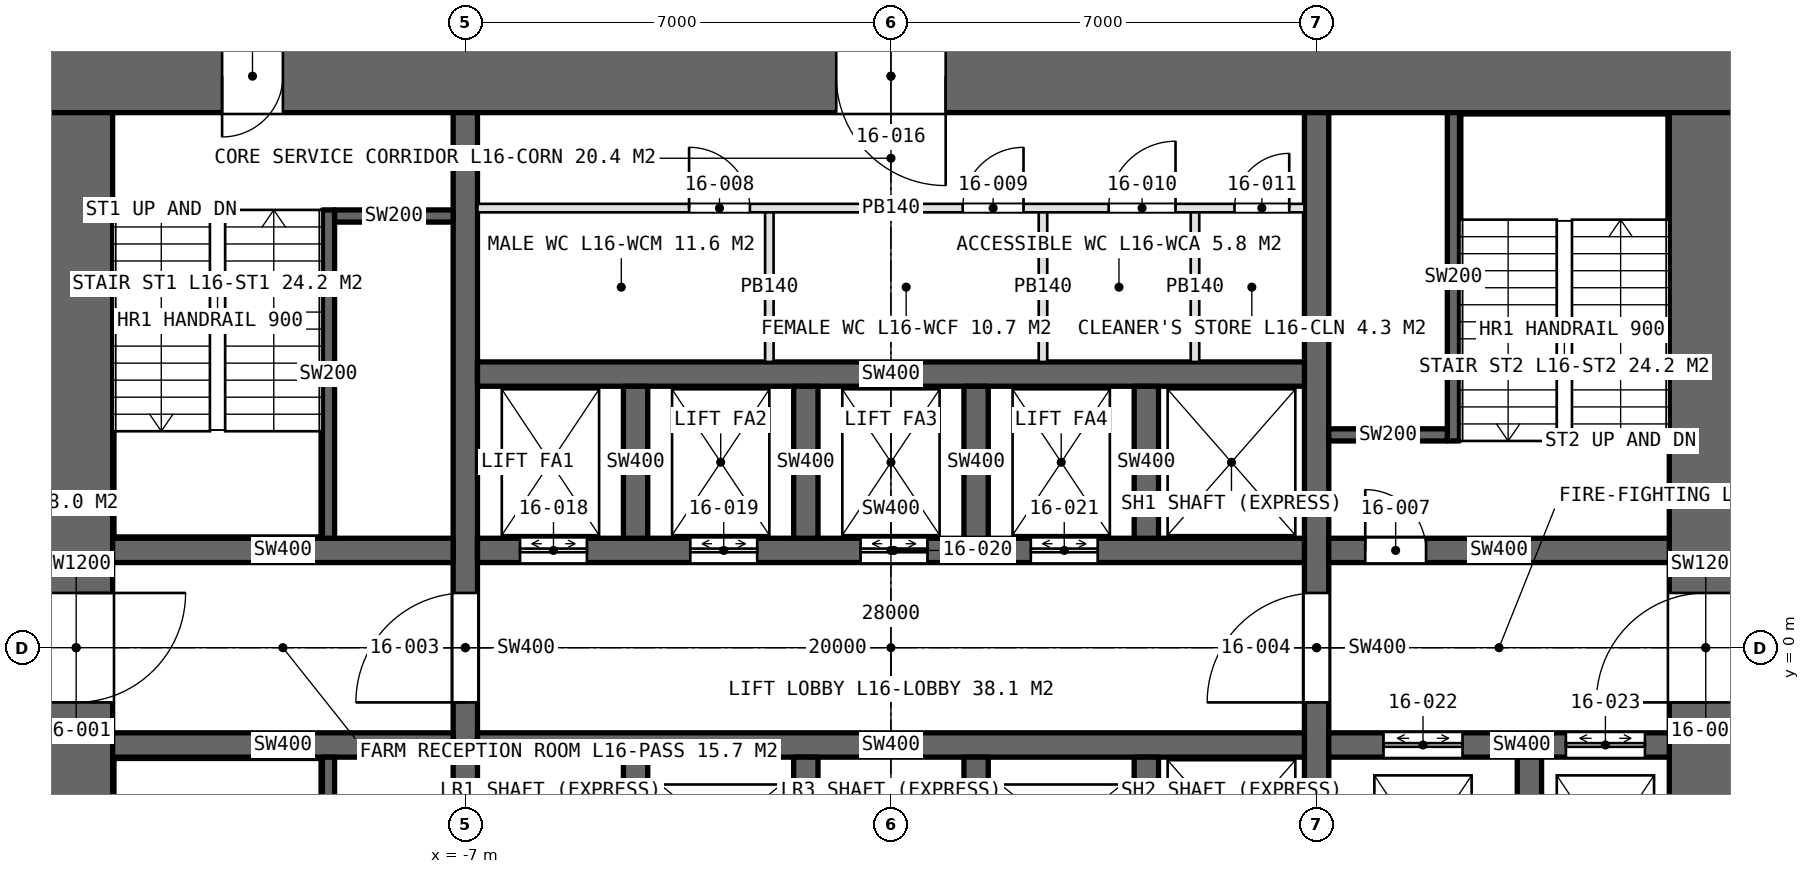
"""IFC4 building model, lengths in metres.
Left out: names, types, materials, properties, quantities, classifications, styles, units other than length and angle.
Written with IfcOpenShell. Run it as: python <this file> out.ifc"""

import sys

from ifc_helpers import new_model, si_unit, direction, frame, frame_2d, origin, place, context, subcontext, project, spatial, rectangle, extrude, element, fill, save


model = new_model("IFC4")
c1 = context("Model", 3, precision=1e-05, world=origin(), true_north=direction((0.0, 1.0)))
c2 = subcontext(c1, "Body", "Model", "MODEL_VIEW")
j1 = project(units=[si_unit("LENGTHUNIT", "METRE"), si_unit("PLANEANGLEUNIT", "RADIAN")], contexts=[c1])
p1 = place(None, origin())
s1 = spatial("IfcSite", under=j1, at=p1, CompositionType="ELEMENT")
p2 = place(p1, origin())
s2 = spatial("IfcBuilding", under=s1, at=p2, CompositionType="ELEMENT")
p3 = place(p2, frame((0.0, 0.0, 80.0)))
s3 = spatial("IfcBuildingStorey", under=s2, at=p3, CompositionType="ELEMENT", Elevation=80.0)
p4 = place(p3, frame((14.0, 9.4, 0.0), z_axis=(0.0, 0.0, 1.0), x_axis=(-1.0, 0.0, 0.0)))
e1 = element("IfcWall", 1, at=p4, inside=s3, PredefinedType="SHEAR", context=c2, shape_type="SweptSolid", body=[
    extrude(rectangle(XDim=28.0, YDim=1.2, at=frame_2d((14.0, 0.0))), origin(), (0.0, 0.0, 1.0), 5.0),
])
p5 = place(p4, frame((24.0, 0.0, 0.0)))
e2 = element("IfcOpeningElement", 2, at=p5, cuts=e1, PredefinedType="OPENING", context=c2, shape_type="SweptSolid", body=[
    extrude(rectangle(XDim=1.0, YDim=2.4, at=frame_2d((0.5, 1.2))), frame((0.0, 0.61, 0.0), z_axis=(0.0, -1.0, 0.0), x_axis=(1.0, 0.0, 0.0)), (0.0, 0.0, 1.0), 1.22),
])
p6 = place(p4, frame((13.1, 0.0, 0.0)))
e3 = element("IfcOpeningElement", 3, at=p6, cuts=e1, PredefinedType="OPENING", context=c2, shape_type="SweptSolid", body=[
    extrude(rectangle(XDim=1.8, YDim=2.4, at=frame_2d((0.9, 1.2))), frame((0.0, 0.61, 0.0), z_axis=(0.0, -1.0, 0.0), x_axis=(1.0, 0.0, 0.0)), (0.0, 0.0, 1.0), 1.22),
])
p7 = place(p3, frame((-13.4, 8.8, 0.0), z_axis=(0.0, 0.0, 1.0), x_axis=(0.0, -1.0, 0.0)))
e4 = element("IfcWall", 4, at=p7, inside=s3, PredefinedType="SHEAR", context=c2, shape_type="SweptSolid", body=[
    extrude(rectangle(XDim=17.6, YDim=1.2, at=frame_2d((8.8, 0.0))), origin(), (0.0, 0.0, 1.0), 5.0),
])
p8 = place(p7, frame((7.9, 0.0, 0.0)))
e5 = element("IfcOpeningElement", 5, at=p8, cuts=e4, PredefinedType="OPENING", context=c2, shape_type="SweptSolid", body=[
    extrude(rectangle(XDim=1.8, YDim=2.4, at=frame_2d((0.9, 1.2))), frame((0.0, 0.61, 0.0), z_axis=(0.0, -1.0, 0.0), x_axis=(1.0, 0.0, 0.0)), (0.0, 0.0, 1.0), 1.22),
])
p9 = place(p7, frame((16.5, 0.0, 0.0)))
e6 = element("IfcOpeningElement", 6, at=p9, cuts=e4, PredefinedType="OPENING", context=c2, shape_type="SweptSolid", body=[
    extrude(rectangle(XDim=1.0, YDim=2.4, at=frame_2d((0.5, 1.2))), frame((0.0, 0.61, 0.0), z_axis=(0.0, -1.0, 0.0), x_axis=(1.0, 0.0, 0.0)), (0.0, 0.0, 1.0), 1.22),
])
p10 = place(p3, frame((13.4, -8.8, 0.0), z_axis=(0.0, 0.0, 1.0), x_axis=(0.0, 1.0, 0.0)))
e7 = element("IfcWall", 7, at=p10, inside=s3, PredefinedType="SHEAR", context=c2, shape_type="SweptSolid", body=[
    extrude(rectangle(XDim=17.6, YDim=1.2, at=frame_2d((8.8, 0.0))), origin(), (0.0, 0.0, 1.0), 5.0),
])
p11 = place(p10, frame((7.9, 0.0, 0.0)))
e8 = element("IfcOpeningElement", 8, at=p11, cuts=e7, PredefinedType="OPENING", context=c2, shape_type="SweptSolid", body=[
    extrude(rectangle(XDim=1.8, YDim=2.4, at=frame_2d((0.9, 1.2))), frame((0.0, 0.61, 0.0), z_axis=(0.0, -1.0, 0.0), x_axis=(1.0, 0.0, 0.0)), (0.0, 0.0, 1.0), 1.22),
])
p12 = place(p3, frame((-7.0, -8.8, 0.0), z_axis=(0.0, 0.0, 1.0), x_axis=(0.0, 1.0, 0.0)))
e9 = element("IfcWall", 9, at=p12, inside=s3, PredefinedType="SHEAR", context=c2, shape_type="SweptSolid", body=[
    extrude(rectangle(XDim=17.6, YDim=0.4, at=frame_2d((8.8, 0.0))), origin(), (0.0, 0.0, 1.0), 5.0),
])
p13 = place(p12, frame((7.9, 0.0, 0.0)))
e10 = element("IfcOpeningElement", 10, at=p13, cuts=e9, PredefinedType="OPENING", context=c2, shape_type="SweptSolid", body=[
    extrude(rectangle(XDim=1.8, YDim=2.4, at=frame_2d((0.9, 1.2))), frame((0.0, 0.21, 0.0), z_axis=(0.0, -1.0, 0.0), x_axis=(1.0, 0.0, 0.0)), (0.0, 0.0, 1.0), 0.42),
])
p14 = place(p3, frame((7.0, -8.8, 0.0), z_axis=(0.0, 0.0, 1.0), x_axis=(0.0, 1.0, 0.0)))
e11 = element("IfcWall", 11, at=p14, inside=s3, PredefinedType="SHEAR", context=c2, shape_type="SweptSolid", body=[
    extrude(rectangle(XDim=17.6, YDim=0.4, at=frame_2d((8.8, 0.0))), origin(), (0.0, 0.0, 1.0), 5.0),
])
p15 = place(p14, frame((7.9, 0.0, 0.0)))
e12 = element("IfcOpeningElement", 12, at=p15, cuts=e11, PredefinedType="OPENING", context=c2, shape_type="SweptSolid", body=[
    extrude(rectangle(XDim=1.8, YDim=2.4, at=frame_2d((0.9, 1.2))), frame((0.0, 0.21, 0.0), z_axis=(0.0, -1.0, 0.0), x_axis=(1.0, 0.0, 0.0)), (0.0, 0.0, 1.0), 0.42),
])
p16 = place(p3, frame((-6.8, 1.6, 0.0), z_axis=(0.0, 0.0, 1.0), x_axis=(1.0, 0.0, 0.0)))
e13 = element("IfcWall", 13, at=p16, inside=s3, PredefinedType="SHEAR", context=c2, shape_type="SweptSolid", body=[
    extrude(rectangle(XDim=13.6, YDim=0.4, at=frame_2d((6.8, 0.0))), origin(), (0.0, 0.0, 1.0), 5.0),
])
p17 = place(p16, frame((0.7, 0.0, 0.0)))
e14 = element("IfcOpeningElement", 14, at=p17, cuts=e13, PredefinedType="OPENING", context=c2, shape_type="SweptSolid", body=[
    extrude(rectangle(XDim=1.1, YDim=2.4, at=frame_2d((0.55, 1.2))), frame((0.0, 0.21, 0.0), z_axis=(0.0, -1.0, 0.0), x_axis=(1.0, 0.0, 0.0)), (0.0, 0.0, 1.0), 0.42),
])
p18 = place(p16, frame((3.5, 0.0, 0.0)))
e15 = element("IfcOpeningElement", 15, at=p18, cuts=e13, PredefinedType="OPENING", context=c2, shape_type="SweptSolid", body=[
    extrude(rectangle(XDim=1.1, YDim=2.4, at=frame_2d((0.55, 1.2))), frame((0.0, 0.21, 0.0), z_axis=(0.0, -1.0, 0.0), x_axis=(1.0, 0.0, 0.0)), (0.0, 0.0, 1.0), 0.42),
])
p19 = place(p16, frame((6.3, 0.0, 0.0)))
e16 = element("IfcOpeningElement", 16, at=p19, cuts=e13, PredefinedType="OPENING", context=c2, shape_type="SweptSolid", body=[
    extrude(rectangle(XDim=1.1, YDim=2.4, at=frame_2d((0.55, 1.2))), frame((0.0, 0.21, 0.0), z_axis=(0.0, -1.0, 0.0), x_axis=(1.0, 0.0, 0.0)), (0.0, 0.0, 1.0), 0.42),
])
p20 = place(p16, frame((9.1, 0.0, 0.0)))
e17 = element("IfcOpeningElement", 17, at=p20, cuts=e13, PredefinedType="OPENING", context=c2, shape_type="SweptSolid", body=[
    extrude(rectangle(XDim=1.1, YDim=2.4, at=frame_2d((0.55, 1.2))), frame((0.0, 0.21, 0.0), z_axis=(0.0, -1.0, 0.0), x_axis=(1.0, 0.0, 0.0)), (0.0, 0.0, 1.0), 0.42),
])
for number, where, z_axis, x_axis in (
    (18, (-6.8, -1.6, 0.0), (0.0, 0.0, 1.0), (1.0, 0.0, 0.0)),
    (19, (-6.8, 4.5, 0.0), (0.0, 0.0, 1.0), (1.0, 0.0, 0.0)),
):
    element("IfcWall", number, at=place(p3, frame(where, z_axis=z_axis, x_axis=x_axis)), inside=s3, PredefinedType="SHEAR", context=c2, shape_type="SweptSolid", body=[
        extrude(rectangle(XDim=13.6, YDim=0.4, at=frame_2d((6.8, 0.0))), origin(), (0.0, 0.0, 1.0), 5.0),
    ])
for number, where, z_axis, x_axis in (
    (20, (-12.8, 1.6, 0.0), (0.0, 0.0, 1.0), (1.0, 0.0, 0.0)),
    (21, (-12.8, -1.6, 0.0), (0.0, 0.0, 1.0), (1.0, 0.0, 0.0)),
):
    element("IfcWall", number, at=place(p3, frame(where, z_axis=z_axis, x_axis=x_axis)), inside=s3, PredefinedType="SHEAR", context=c2, shape_type="SweptSolid", body=[
        extrude(rectangle(XDim=5.6, YDim=0.4, at=frame_2d((2.8, 0.0))), origin(), (0.0, 0.0, 1.0), 5.0),
    ])
p21 = place(p3, frame((7.2, 1.6, 0.0), z_axis=(0.0, 0.0, 1.0), x_axis=(1.0, 0.0, 0.0)))
e22 = element("IfcWall", 22, at=p21, inside=s3, PredefinedType="SHEAR", context=c2, shape_type="SweptSolid", body=[
    extrude(rectangle(XDim=5.6, YDim=0.4, at=frame_2d((2.8, 0.0))), origin(), (0.0, 0.0, 1.0), 5.0),
])
p22 = place(p21, frame((0.6, 0.0, 0.0)))
e23 = element("IfcOpeningElement", 23, at=p22, cuts=e22, PredefinedType="OPENING", context=c2, shape_type="SweptSolid", body=[
    extrude(rectangle(XDim=1.0, YDim=2.4, at=frame_2d((0.5, 1.2))), frame((0.0, 0.21, 0.0), z_axis=(0.0, -1.0, 0.0), x_axis=(1.0, 0.0, 0.0)), (0.0, 0.0, 1.0), 0.42),
])
p23 = place(p3, frame((7.2, -1.6, 0.0), z_axis=(0.0, 0.0, 1.0), x_axis=(1.0, 0.0, 0.0)))
e24 = element("IfcWall", 24, at=p23, inside=s3, PredefinedType="SHEAR", context=c2, shape_type="SweptSolid", body=[
    extrude(rectangle(XDim=5.6, YDim=0.4, at=frame_2d((2.8, 0.0))), origin(), (0.0, 0.0, 1.0), 5.0),
])
p24 = place(p23, frame((0.9, 0.0, 0.0)))
e25 = element("IfcOpeningElement", 25, at=p24, cuts=e24, PredefinedType="OPENING", context=c2, shape_type="SweptSolid", body=[
    extrude(rectangle(XDim=1.3, YDim=2.4, at=frame_2d((0.65, 1.2))), frame((0.0, 0.21, 0.0), z_axis=(0.0, -1.0, 0.0), x_axis=(1.0, 0.0, 0.0)), (0.0, 0.0, 1.0), 0.42),
])
p25 = place(p23, frame((3.9, 0.0, 0.0)))
e26 = element("IfcOpeningElement", 26, at=p25, cuts=e24, PredefinedType="OPENING", context=c2, shape_type="SweptSolid", body=[
    extrude(rectangle(XDim=1.3, YDim=2.4, at=frame_2d((0.65, 1.2))), frame((0.0, 0.21, 0.0), z_axis=(0.0, -1.0, 0.0), x_axis=(1.0, 0.0, 0.0)), (0.0, 0.0, 1.0), 0.42),
])
p26 = place(p3, frame((10.5, -4.8, 0.0), z_axis=(0.0, 0.0, 1.0), x_axis=(0.0, 1.0, 0.0)))
e27 = element("IfcWall", 27, at=p26, inside=s3, PredefinedType="SHEAR", context=c2, shape_type="SweptSolid", body=[
    extrude(rectangle(XDim=3.0, YDim=0.4, at=frame_2d((1.5, 0.0))), origin(), (0.0, 0.0, 1.0), 5.0),
])
for number, where, z_axis, x_axis in (
    (28, (-4.2, 1.8, 0.0), (0.0, 0.0, 1.0), (0.0, 1.0, 0.0)),
    (29, (-4.2, -4.3, 0.0), (0.0, 0.0, 1.0), (0.0, 1.0, 0.0)),
    (30, (-1.4, 1.8, 0.0), (0.0, 0.0, 1.0), (0.0, 1.0, 0.0)),
    (31, (-1.4, -4.3, 0.0), (0.0, 0.0, 1.0), (0.0, 1.0, 0.0)),
    (32, (1.4, 1.8, 0.0), (0.0, 0.0, 1.0), (0.0, 1.0, 0.0)),
    (33, (1.4, -4.3, 0.0), (0.0, 0.0, 1.0), (0.0, 1.0, 0.0)),
    (34, (4.2, 1.8, 0.0), (0.0, 0.0, 1.0), (0.0, 1.0, 0.0)),
    (35, (4.2, -4.3, 0.0), (0.0, 0.0, 1.0), (0.0, 1.0, 0.0)),
):
    element("IfcWall", number, at=place(p3, frame(where, z_axis=z_axis, x_axis=x_axis)), inside=s3, PredefinedType="SHEAR", context=c2, shape_type="SweptSolid", body=[
        extrude(rectangle(XDim=2.5, YDim=0.4, at=frame_2d((1.25, 0.0))), origin(), (0.0, 0.0, 1.0), 5.0),
    ])
p27 = place(p3, frame((-6.8, 7.23, 0.0), z_axis=(0.0, 0.0, 1.0), x_axis=(1.0, 0.0, 0.0)))
e36 = element("IfcWall", 36, at=p27, inside=s3, PredefinedType="PARTITIONING", context=c2, shape_type="SweptSolid", body=[
    extrude(rectangle(XDim=13.6, YDim=0.14, at=frame_2d((6.8, 0.0))), origin(), (0.0, 0.0, 1.0), 4.75),
])
p28 = place(p27, frame((3.48, 0.0, 0.0)))
e37 = element("IfcOpeningElement", 37, at=p28, cuts=e36, PredefinedType="OPENING", context=c2, shape_type="SweptSolid", body=[
    extrude(rectangle(XDim=1.0, YDim=2.4, at=frame_2d((0.5, 1.2))), frame((0.0, 0.08, 0.0), z_axis=(0.0, -1.0, 0.0), x_axis=(1.0, 0.0, 0.0)), (0.0, 0.0, 1.0), 0.16),
])
p29 = place(p27, frame((7.98, 0.0, 0.0)))
e38 = element("IfcOpeningElement", 38, at=p29, cuts=e36, PredefinedType="OPENING", context=c2, shape_type="SweptSolid", body=[
    extrude(rectangle(XDim=1.0, YDim=2.4, at=frame_2d((0.5, 1.2))), frame((0.0, 0.08, 0.0), z_axis=(0.0, -1.0, 0.0), x_axis=(1.0, 0.0, 0.0)), (0.0, 0.0, 1.0), 0.16),
])
p30 = place(p27, frame((10.38, 0.0, 0.0)))
e39 = element("IfcOpeningElement", 39, at=p30, cuts=e36, PredefinedType="OPENING", context=c2, shape_type="SweptSolid", body=[
    extrude(rectangle(XDim=1.1, YDim=2.4, at=frame_2d((0.55, 1.2))), frame((0.0, 0.08, 0.0), z_axis=(0.0, -1.0, 0.0), x_axis=(1.0, 0.0, 0.0)), (0.0, 0.0, 1.0), 0.16),
])
p31 = place(p27, frame((12.45, 0.0, 0.0)))
e40 = element("IfcOpeningElement", 40, at=p31, cuts=e36, PredefinedType="OPENING", context=c2, shape_type="SweptSolid", body=[
    extrude(rectangle(XDim=0.9, YDim=2.4, at=frame_2d((0.45, 1.2))), frame((0.0, 0.08, 0.0), z_axis=(0.0, -1.0, 0.0), x_axis=(1.0, 0.0, 0.0)), (0.0, 0.0, 1.0), 0.16),
])
for number, where, z_axis, x_axis in (
    (41, (-2.0, 4.7, 0.0), (0.0, 0.0, 1.0), (0.0, 1.0, 0.0)),
    (42, (2.5, 4.7, 0.0), (0.0, 0.0, 1.0), (0.0, 1.0, 0.0)),
    (43, (5.0, 4.7, 0.0), (0.0, 0.0, 1.0), (0.0, 1.0, 0.0)),
):
    element("IfcWall", number, at=place(p3, frame(where, z_axis=z_axis, x_axis=x_axis)), inside=s3, PredefinedType="PARTITIONING", context=c2, shape_type="SweptSolid", body=[
        extrude(rectangle(XDim=2.46, YDim=0.14, at=frame_2d((1.23, 0.0))), origin(), (0.0, 0.0, 1.0), 4.75),
    ])
p32 = place(p3, frame((-9.25, 7.2, 0.0), z_axis=(0.0, 0.0, 1.0), x_axis=(0.0, -1.0, 0.0)))
e44 = element("IfcWall", 44, at=p32, inside=s3, PredefinedType="SOLIDWALL", context=c2, shape_type="SweptSolid", body=[
    extrude(rectangle(XDim=5.4, YDim=0.2, at=frame_2d((2.7, 0.0))), origin(), (0.0, 0.0, 1.0), 5.0),
])
p33 = place(p3, frame((-9.15, 7.1, 0.0), z_axis=(0.0, 0.0, 1.0), x_axis=(1.0, 0.0, 0.0)))
e45 = element("IfcWall", 45, at=p33, inside=s3, PredefinedType="SOLIDWALL", context=c2, shape_type="SweptSolid", body=[
    extrude(rectangle(XDim=1.95, YDim=0.2, at=frame_2d((0.975, 0.0))), origin(), (0.0, 0.0, 1.0), 5.0),
])
p34 = place(p3, frame((-9.25, -7.2, 0.0), z_axis=(0.0, 0.0, 1.0), x_axis=(0.0, 1.0, 0.0)))
e46 = element("IfcWall", 46, at=p34, inside=s3, PredefinedType="SOLIDWALL", context=c2, shape_type="SweptSolid", body=[
    extrude(rectangle(XDim=5.4, YDim=0.2, at=frame_2d((2.7, 0.0))), origin(), (0.0, 0.0, 1.0), 5.0),
])
p35 = place(p3, frame((9.25, 3.4, 0.0), z_axis=(0.0, 0.0, 1.0), x_axis=(0.0, 1.0, 0.0)))
e47 = element("IfcWall", 47, at=p35, inside=s3, PredefinedType="SOLIDWALL", context=c2, shape_type="SweptSolid", body=[
    extrude(rectangle(XDim=5.4, YDim=0.2, at=frame_2d((2.7, 0.0))), origin(), (0.0, 0.0, 1.0), 5.0),
])
p36 = place(p3, frame((9.15, 3.5, 0.0), z_axis=(0.0, 0.0, 1.0), x_axis=(-1.0, 0.0, 0.0)))
e48 = element("IfcWall", 48, at=p36, inside=s3, PredefinedType="SOLIDWALL", context=c2, shape_type="SweptSolid", body=[
    extrude(rectangle(XDim=1.95, YDim=0.2, at=frame_2d((0.975, 0.0))), origin(), (0.0, 0.0, 1.0), 5.0),
])
p37 = place(p8, origin())
e49 = element("IfcDoor", 49, at=p37, inside=s3, OperationType="DOUBLE_DOOR_SINGLE_SWING", PredefinedType="DOOR", context=c2, shape_type="SweptSolid", body=[
    extrude(rectangle(XDim=1.8, YDim=2.4, at=frame_2d((0.9, 1.2))), frame((0.0, 0.025, 0.0), z_axis=(0.0, -1.0, 0.0), x_axis=(1.0, 0.0, 0.0)), (0.0, 0.0, 1.0), 0.05),
])
fill(e5, e49)
p38 = place(p11, origin())
e50 = element("IfcDoor", 50, at=p38, inside=s3, OperationType="DOUBLE_DOOR_SINGLE_SWING", PredefinedType="DOOR", context=c2, shape_type="SweptSolid", body=[
    extrude(rectangle(XDim=1.8, YDim=2.4, at=frame_2d((0.9, 1.2))), frame((0.0, 0.025, 0.0), z_axis=(0.0, -1.0, 0.0), x_axis=(1.0, 0.0, 0.0)), (0.0, 0.0, 1.0), 0.05),
])
fill(e8, e50)
p39 = place(p13, origin())
e51 = element("IfcDoor", 51, at=p39, inside=s3, OperationType="DOUBLE_DOOR_SINGLE_SWING", PredefinedType="DOOR", context=c2, shape_type="SweptSolid", body=[
    extrude(rectangle(XDim=1.8, YDim=2.4, at=frame_2d((0.9, 1.2))), frame((0.0, 0.025, 0.0), z_axis=(0.0, -1.0, 0.0), x_axis=(1.0, 0.0, 0.0)), (0.0, 0.0, 1.0), 0.05),
])
fill(e10, e51)
p40 = place(p15, origin())
e52 = element("IfcDoor", 52, at=p40, inside=s3, OperationType="DOUBLE_DOOR_SINGLE_SWING", PredefinedType="DOOR", context=c2, shape_type="SweptSolid", body=[
    extrude(rectangle(XDim=1.8, YDim=2.4, at=frame_2d((0.9, 1.2))), frame((0.0, 0.025, 0.0), z_axis=(0.0, -1.0, 0.0), x_axis=(1.0, 0.0, 0.0)), (0.0, 0.0, 1.0), 0.05),
])
fill(e12, e52)
p41 = place(p5, origin())
e53 = element("IfcDoor", 53, at=p41, inside=s3, OperationType="SINGLE_SWING_RIGHT", PredefinedType="DOOR", context=c2, shape_type="SweptSolid", body=[
    extrude(rectangle(XDim=1.0, YDim=2.4, at=frame_2d((0.5, 1.2))), frame((0.0, 0.025, 0.0), z_axis=(0.0, -1.0, 0.0), x_axis=(1.0, 0.0, 0.0)), (0.0, 0.0, 1.0), 0.05),
])
fill(e2, e53)
p42 = place(p22, origin())
e54 = element("IfcDoor", 54, at=p42, inside=s3, OperationType="SINGLE_SWING_LEFT", PredefinedType="DOOR", context=c2, shape_type="SweptSolid", body=[
    extrude(rectangle(XDim=1.0, YDim=2.4, at=frame_2d((0.5, 1.2))), frame((0.0, 0.025, 0.0), z_axis=(0.0, -1.0, 0.0), x_axis=(1.0, 0.0, 0.0)), (0.0, 0.0, 1.0), 0.05),
])
fill(e23, e54)
p43 = place(p28, origin())
e55 = element("IfcDoor", 55, at=p43, inside=s3, OperationType="SINGLE_SWING_LEFT", PredefinedType="DOOR", context=c2, shape_type="SweptSolid", body=[
    extrude(rectangle(XDim=1.0, YDim=2.4, at=frame_2d((0.5, 1.2))), frame((0.0, 0.025, 0.0), z_axis=(0.0, -1.0, 0.0), x_axis=(1.0, 0.0, 0.0)), (0.0, 0.0, 1.0), 0.05),
])
fill(e37, e55)
p44 = place(p29, origin())
e56 = element("IfcDoor", 56, at=p44, inside=s3, OperationType="SINGLE_SWING_RIGHT", PredefinedType="DOOR", context=c2, shape_type="SweptSolid", body=[
    extrude(rectangle(XDim=1.0, YDim=2.4, at=frame_2d((0.5, 1.2))), frame((0.0, 0.025, 0.0), z_axis=(0.0, -1.0, 0.0), x_axis=(1.0, 0.0, 0.0)), (0.0, 0.0, 1.0), 0.05),
])
fill(e38, e56)
p45 = place(p30, origin())
e57 = element("IfcDoor", 57, at=p45, inside=s3, OperationType="SINGLE_SWING_RIGHT", PredefinedType="DOOR", context=c2, shape_type="SweptSolid", body=[
    extrude(rectangle(XDim=1.1, YDim=2.4, at=frame_2d((0.55, 1.2))), frame((0.0, 0.025, 0.0), z_axis=(0.0, -1.0, 0.0), x_axis=(1.0, 0.0, 0.0)), (0.0, 0.0, 1.0), 0.05),
])
fill(e39, e57)
p46 = place(p31, origin())
e58 = element("IfcDoor", 58, at=p46, inside=s3, OperationType="SINGLE_SWING_RIGHT", PredefinedType="DOOR", context=c2, shape_type="SweptSolid", body=[
    extrude(rectangle(XDim=0.9, YDim=2.4, at=frame_2d((0.45, 1.2))), frame((0.0, 0.025, 0.0), z_axis=(0.0, -1.0, 0.0), x_axis=(1.0, 0.0, 0.0)), (0.0, 0.0, 1.0), 0.05),
])
fill(e40, e58)
p47 = place(p6, origin())
e59 = element("IfcDoor", 59, at=p47, inside=s3, OperationType="DOUBLE_DOOR_SINGLE_SWING", PredefinedType="DOOR", context=c2, shape_type="SweptSolid", body=[
    extrude(rectangle(XDim=1.8, YDim=2.4, at=frame_2d((0.9, 1.2))), frame((0.0, 0.025, 0.0), z_axis=(0.0, -1.0, 0.0), x_axis=(1.0, 0.0, 0.0)), (0.0, 0.0, 1.0), 0.05),
])
fill(e3, e59)
p48 = place(p17, origin())
e60 = element("IfcDoor", 60, at=p48, inside=s3, OperationType="DOUBLE_DOOR_SLIDING", PredefinedType="DOOR", context=c2, shape_type="SweptSolid", body=[
    extrude(rectangle(XDim=1.1, YDim=2.4, at=frame_2d((0.55, 1.2))), frame((0.0, 0.025, 0.0), z_axis=(0.0, -1.0, 0.0), x_axis=(1.0, 0.0, 0.0)), (0.0, 0.0, 1.0), 0.05),
])
fill(e14, e60)
p49 = place(p18, origin())
e61 = element("IfcDoor", 61, at=p49, inside=s3, OperationType="DOUBLE_DOOR_SLIDING", PredefinedType="DOOR", context=c2, shape_type="SweptSolid", body=[
    extrude(rectangle(XDim=1.1, YDim=2.4, at=frame_2d((0.55, 1.2))), frame((0.0, 0.025, 0.0), z_axis=(0.0, -1.0, 0.0), x_axis=(1.0, 0.0, 0.0)), (0.0, 0.0, 1.0), 0.05),
])
fill(e15, e61)
p50 = place(p19, origin())
e62 = element("IfcDoor", 62, at=p50, inside=s3, OperationType="DOUBLE_DOOR_SLIDING", PredefinedType="DOOR", context=c2, shape_type="SweptSolid", body=[
    extrude(rectangle(XDim=1.1, YDim=2.4, at=frame_2d((0.55, 1.2))), frame((0.0, 0.025, 0.0), z_axis=(0.0, -1.0, 0.0), x_axis=(1.0, 0.0, 0.0)), (0.0, 0.0, 1.0), 0.05),
])
fill(e16, e62)
p51 = place(p20, origin())
e63 = element("IfcDoor", 63, at=p51, inside=s3, OperationType="DOUBLE_DOOR_SLIDING", PredefinedType="DOOR", context=c2, shape_type="SweptSolid", body=[
    extrude(rectangle(XDim=1.1, YDim=2.4, at=frame_2d((0.55, 1.2))), frame((0.0, 0.025, 0.0), z_axis=(0.0, -1.0, 0.0), x_axis=(1.0, 0.0, 0.0)), (0.0, 0.0, 1.0), 0.05),
])
fill(e17, e63)
p52 = place(p24, origin())
e64 = element("IfcDoor", 64, at=p52, inside=s3, OperationType="DOUBLE_DOOR_SLIDING", PredefinedType="DOOR", context=c2, shape_type="SweptSolid", body=[
    extrude(rectangle(XDim=1.3, YDim=2.4, at=frame_2d((0.65, 1.2))), frame((0.0, 0.025, 0.0), z_axis=(0.0, -1.0, 0.0), x_axis=(1.0, 0.0, 0.0)), (0.0, 0.0, 1.0), 0.05),
])
fill(e25, e64)
p53 = place(p25, origin())
e65 = element("IfcDoor", 65, at=p53, inside=s3, OperationType="DOUBLE_DOOR_SLIDING", PredefinedType="DOOR", context=c2, shape_type="SweptSolid", body=[
    extrude(rectangle(XDim=1.3, YDim=2.4, at=frame_2d((0.65, 1.2))), frame((0.0, 0.025, 0.0), z_axis=(0.0, -1.0, 0.0), x_axis=(1.0, 0.0, 0.0)), (0.0, 0.0, 1.0), 0.05),
])
fill(e26, e65)
save(model, sys.argv[1])
